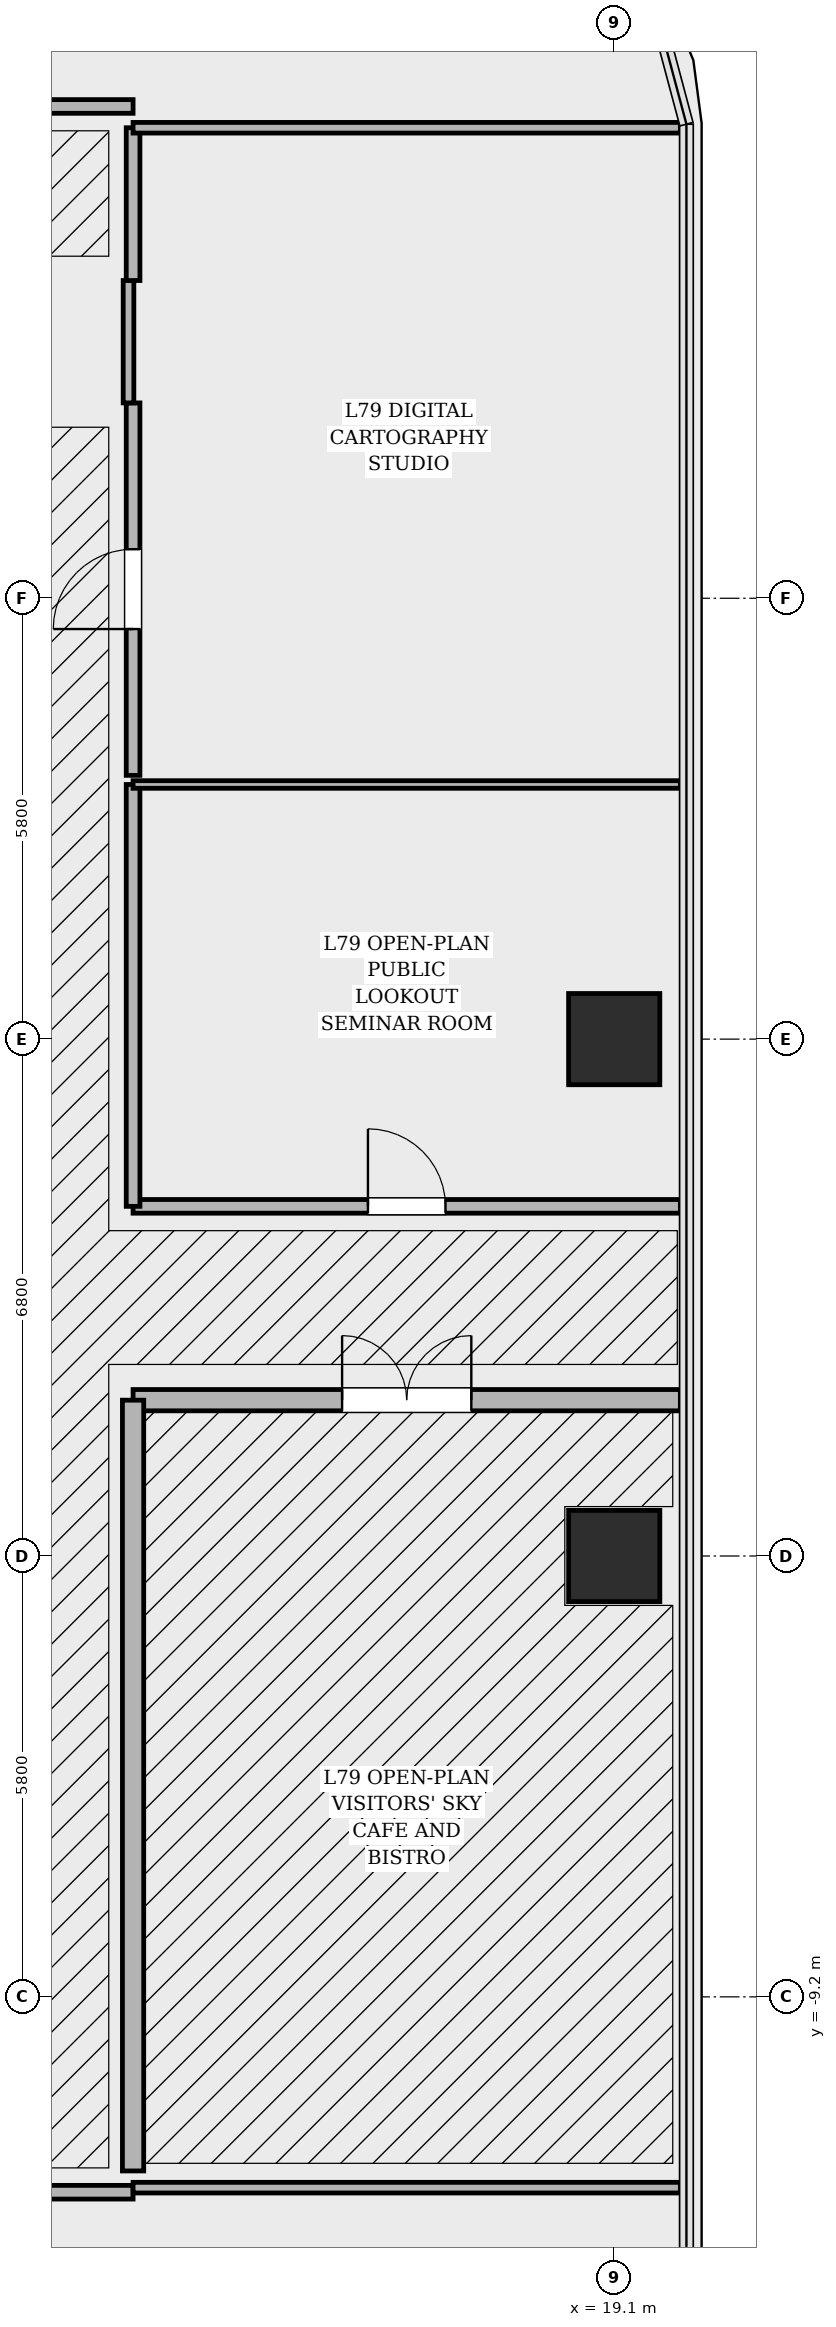
"""IFC4 building model, lengths in metres.
Left out: names, types, materials, properties, quantities, classifications, styles, units other than length and angle.
Written with IfcOpenShell. Run it as: python <this file> out.ifc"""

import sys

from ifc_helpers import new_model, si_unit, direction, frame, frame_2d, origin, origin_2d, place, context, subcontext, project, spatial, rectangle, hollow_rectangle, extrude, element, fill, save


model = new_model("IFC4")
c1 = context("Model", 3, precision=1e-05, world=origin(), true_north=direction((0.0, 1.0)))
c2 = subcontext(c1, "Body", "Model", "MODEL_VIEW")
j1 = project(units=[si_unit("LENGTHUNIT", "METRE"), si_unit("PLANEANGLEUNIT", "RADIAN")], contexts=[c1])
p1 = place(None, origin())
s1 = spatial("IfcSite", under=j1, at=p1, CompositionType="ELEMENT")
p2 = place(p1, origin())
s2 = spatial("IfcBuilding", under=s1, at=p2, CompositionType="ELEMENT")
p3 = place(p2, frame((0.0, 0.0, 334.2)))
s3 = spatial("IfcBuildingStorey", under=s2, at=p3, CompositionType="ELEMENT", Elevation=334.2)
for number, where, z_axis, x_axis in (
    (1, (19.1, -3.4, 0.0), (0.0, 0.0, 1.0), (1.0, 0.0, 0.0)),
    (2, (19.1, 3.4, 0.0), (0.0, 0.0, 1.0), (1.0, 0.0, 0.0)),
):
    element("IfcColumn", number, at=place(p3, frame(where, z_axis=z_axis, x_axis=x_axis)), inside=s3, PredefinedType="COLUMN", context=c2, shape_type="SweptSolid", body=[
        extrude(hollow_rectangle(XDim=1.2, YDim=1.2, WallThickness=0.035, at=origin_2d()), origin(), (0.0, 0.0, 1.0), 4.8),
    ])
p4 = place(p3, frame((1.27, -11.77, 0.0), z_axis=(0.0, 0.0, 1.0), x_axis=(1.0, 0.0, 0.0)))
e3 = element("IfcWall", 3, at=p4, inside=s3, PredefinedType="PARTITIONING", context=c2, shape_type="SweptSolid", body=[
    extrude(rectangle(XDim=11.5, YDim=0.18, at=frame_2d((5.75, 0.0))), origin(), (0.0, 0.0, 1.0), 3.214),
])
p5 = place(p3, frame((12.77, -11.71, 0.0), z_axis=(0.0, 0.0, 1.0), x_axis=(1.0, 0.0, 0.0)))
e4 = element("IfcWall", 4, at=p5, inside=s3, PredefinedType="PARTITIONING", context=c2, shape_type="SweptSolid", body=[
    extrude(rectangle(XDim=7.2, YDim=0.14, at=frame_2d((3.6, 0.0))), origin(), (0.0, 0.0, 1.0), 3.214),
])
p6 = place(p3, frame((12.77, -1.35, 0.0), z_axis=(0.0, 0.0, 1.0), x_axis=(1.0, 0.0, 0.0)))
e5 = element("IfcWall", 5, at=p6, inside=s3, PredefinedType="SOLIDWALL", context=c2, shape_type="SweptSolid", body=[
    extrude(rectangle(XDim=7.2, YDim=0.28, at=frame_2d((3.6, 0.0))), origin(), (0.0, 0.0, 1.0), 3.214),
])
p7 = place(p6, frame((2.75, 0.0, 0.0)))
e6 = element("IfcOpeningElement", 6, at=p7, cuts=e5, PredefinedType="OPENING", context=c2, shape_type="SweptSolid", body=[
    extrude(rectangle(XDim=1.7, YDim=2.3, at=frame_2d((0.85, 1.15))), frame((0.0, 0.15, 0.0), z_axis=(0.0, -1.0, 0.0), x_axis=(1.0, 0.0, 0.0)), (0.0, 0.0, 1.0), 0.3),
])
p8 = place(p3, frame((12.77, -11.49, 0.0), z_axis=(0.0, 0.0, 1.0), x_axis=(0.0, 1.0, 0.0)))
e7 = element("IfcWall", 7, at=p8, inside=s3, PredefinedType="SOLIDWALL", context=c2, shape_type="SweptSolid", body=[
    extrude(rectangle(XDim=10.14, YDim=0.28, at=frame_2d((5.07, 0.0))), origin(), (0.0, 0.0, 1.0), 3.214),
])
p9 = place(p3, frame((19.97, 1.2, 0.0), z_axis=(0.0, 0.0, 1.0), x_axis=(-1.0, 0.0, 0.0)))
e8 = element("IfcWall", 8, at=p9, inside=s3, PredefinedType="PARTITIONING", context=c2, shape_type="SweptSolid", body=[
    extrude(rectangle(XDim=7.2, YDim=0.18, at=frame_2d((3.6, 0.0))), origin(), (0.0, 0.0, 1.0), 3.214),
])
p10 = place(p9, frame((3.09, 0.0, 0.0)))
e9 = element("IfcOpeningElement", 9, at=p10, cuts=e8, PredefinedType="OPENING", context=c2, shape_type="SweptSolid", body=[
    extrude(rectangle(XDim=1.02, YDim=2.2, at=frame_2d((0.51, 1.1))), frame((0.0, 0.1, 0.0), z_axis=(0.0, -1.0, 0.0), x_axis=(1.0, 0.0, 0.0)), (0.0, 0.0, 1.0), 0.2),
])
p11 = place(p3, frame((12.77, 1.2, 0.0), z_axis=(0.0, 0.0, 1.0), x_axis=(0.0, 1.0, 0.0)))
e10 = element("IfcWall", 10, at=p11, inside=s3, PredefinedType="PARTITIONING", context=c2, shape_type="SweptSolid", body=[
    extrude(rectangle(XDim=5.55, YDim=0.18, at=frame_2d((2.775, 0.0))), origin(), (0.0, 0.0, 1.0), 3.214),
])
p12 = place(p3, frame((12.77, 6.75, 0.0), z_axis=(0.0, 0.0, 1.0), x_axis=(1.0, 0.0, 0.0)))
e11 = element("IfcWall", 11, at=p12, inside=s3, PredefinedType="PARTITIONING", context=c2, shape_type="SweptSolid", body=[
    extrude(rectangle(XDim=7.2, YDim=0.1, at=frame_2d((3.6, 0.0))), origin(), (0.0, 0.0, 1.0), 3.214),
])
p13 = place(p3, frame((12.77, 6.87, 0.0), z_axis=(0.0, 0.0, 1.0), x_axis=(0.0, 1.0, 0.0)))
e12 = element("IfcWall", 12, at=p13, inside=s3, PredefinedType="PARTITIONING", context=c2, shape_type="SweptSolid", body=[
    extrude(rectangle(XDim=4.9, YDim=0.18, at=frame_2d((2.45, 0.0))), origin(), (0.0, 0.0, 1.0), 3.214),
])
p14 = place(p13, frame((1.925, 0.0, 0.0)))
e13 = element("IfcOpeningElement", 13, at=p14, cuts=e12, PredefinedType="OPENING", context=c2, shape_type="SweptSolid", body=[
    extrude(rectangle(XDim=1.05, YDim=2.2, at=frame_2d((0.525, 1.1))), frame((0.0, 0.1, 0.0), z_axis=(0.0, -1.0, 0.0), x_axis=(1.0, 0.0, 0.0)), (0.0, 0.0, 1.0), 0.2),
])
p15 = place(p3, frame((12.71, 11.77, 0.0), z_axis=(0.0, 0.0, 1.0), x_axis=(0.0, 1.0, 0.0)))
e14 = element("IfcWall", 14, at=p15, inside=s3, PredefinedType="PARTITIONING", context=c2, shape_type="SweptSolid", body=[
    extrude(rectangle(XDim=1.61, YDim=0.14, at=frame_2d((0.805, 0.0))), origin(), (0.0, 0.0, 1.0), 4.174),
])
p16 = place(p3, frame((12.77, 13.38, 0.0), z_axis=(0.0, 0.0, 1.0), x_axis=(0.0, 1.0, 0.0)))
e15 = element("IfcWall", 15, at=p16, inside=s3, PredefinedType="PARTITIONING", context=c2, shape_type="SweptSolid", body=[
    extrude(rectangle(XDim=2.01, YDim=0.18, at=frame_2d((1.005, 0.0))), origin(), (0.0, 0.0, 1.0), 4.174),
])
p17 = place(p3, frame((12.77, 15.39, 0.0), z_axis=(0.0, 0.0, 1.0), x_axis=(1.0, 0.0, 0.0)))
e16 = element("IfcWall", 16, at=p17, inside=s3, PredefinedType="PARTITIONING", context=c2, shape_type="SweptSolid", body=[
    extrude(rectangle(XDim=7.2, YDim=0.14, at=frame_2d((3.6, 0.0))), origin(), (0.0, 0.0, 1.0), 3.214),
])
p18 = place(p3, frame((12.77, 15.67, 0.0), z_axis=(0.0, 0.0, 1.0), x_axis=(-1.0, 0.0, 0.0)))
e17 = element("IfcWall", 17, at=p18, inside=s3, PredefinedType="PARTITIONING", context=c2, shape_type="SweptSolid", body=[
    extrude(rectangle(XDim=15.11, YDim=0.18, at=frame_2d((7.555, 0.0))), origin(), (0.0, 0.0, 1.0), 3.214),
])
p19 = place(p18, frame((7.03, 0.0, 0.0)))
e18 = element("IfcOpeningElement", 18, at=p19, cuts=e17, PredefinedType="OPENING", context=c2, shape_type="SweptSolid", body=[
    extrude(rectangle(XDim=1.05, YDim=2.2, at=frame_2d((0.525, 1.1))), frame((0.0, 0.1, 0.0), z_axis=(0.0, -1.0, 0.0), x_axis=(1.0, 0.0, 0.0)), (0.0, 0.0, 1.0), 0.2),
])
p20 = place(p7, origin())
e19 = element("IfcDoor", 19, at=p20, inside=s3, OperationType="DOUBLE_DOOR_SINGLE_SWING", PredefinedType="DOOR", context=c2, shape_type="SweptSolid", body=[
    extrude(rectangle(XDim=1.7, YDim=2.3, at=frame_2d((0.85, 1.15))), frame((0.0, 0.025, 0.0), z_axis=(0.0, -1.0, 0.0), x_axis=(1.0, 0.0, 0.0)), (0.0, 0.0, 1.0), 0.05),
])
fill(e6, e19)
p21 = place(p10, origin())
e20 = element("IfcDoor", 20, at=p21, inside=s3, OperationType="SINGLE_SWING_RIGHT", PredefinedType="DOOR", context=c2, shape_type="SweptSolid", body=[
    extrude(rectangle(XDim=1.02, YDim=2.2, at=frame_2d((0.51, 1.1))), frame((0.0, 0.025, 0.0), z_axis=(0.0, -1.0, 0.0), x_axis=(1.0, 0.0, 0.0)), (0.0, 0.0, 1.0), 0.05),
])
fill(e9, e20)
p22 = place(p14, origin())
e21 = element("IfcDoor", 21, at=p22, inside=s3, OperationType="SINGLE_SWING_LEFT", PredefinedType="DOOR", context=c2, shape_type="SweptSolid", body=[
    extrude(rectangle(XDim=1.05, YDim=2.2, at=frame_2d((0.525, 1.1))), frame((0.0, 0.025, 0.0), z_axis=(0.0, -1.0, 0.0), x_axis=(1.0, 0.0, 0.0)), (0.0, 0.0, 1.0), 0.05),
])
fill(e13, e21)
save(model, sys.argv[1])
